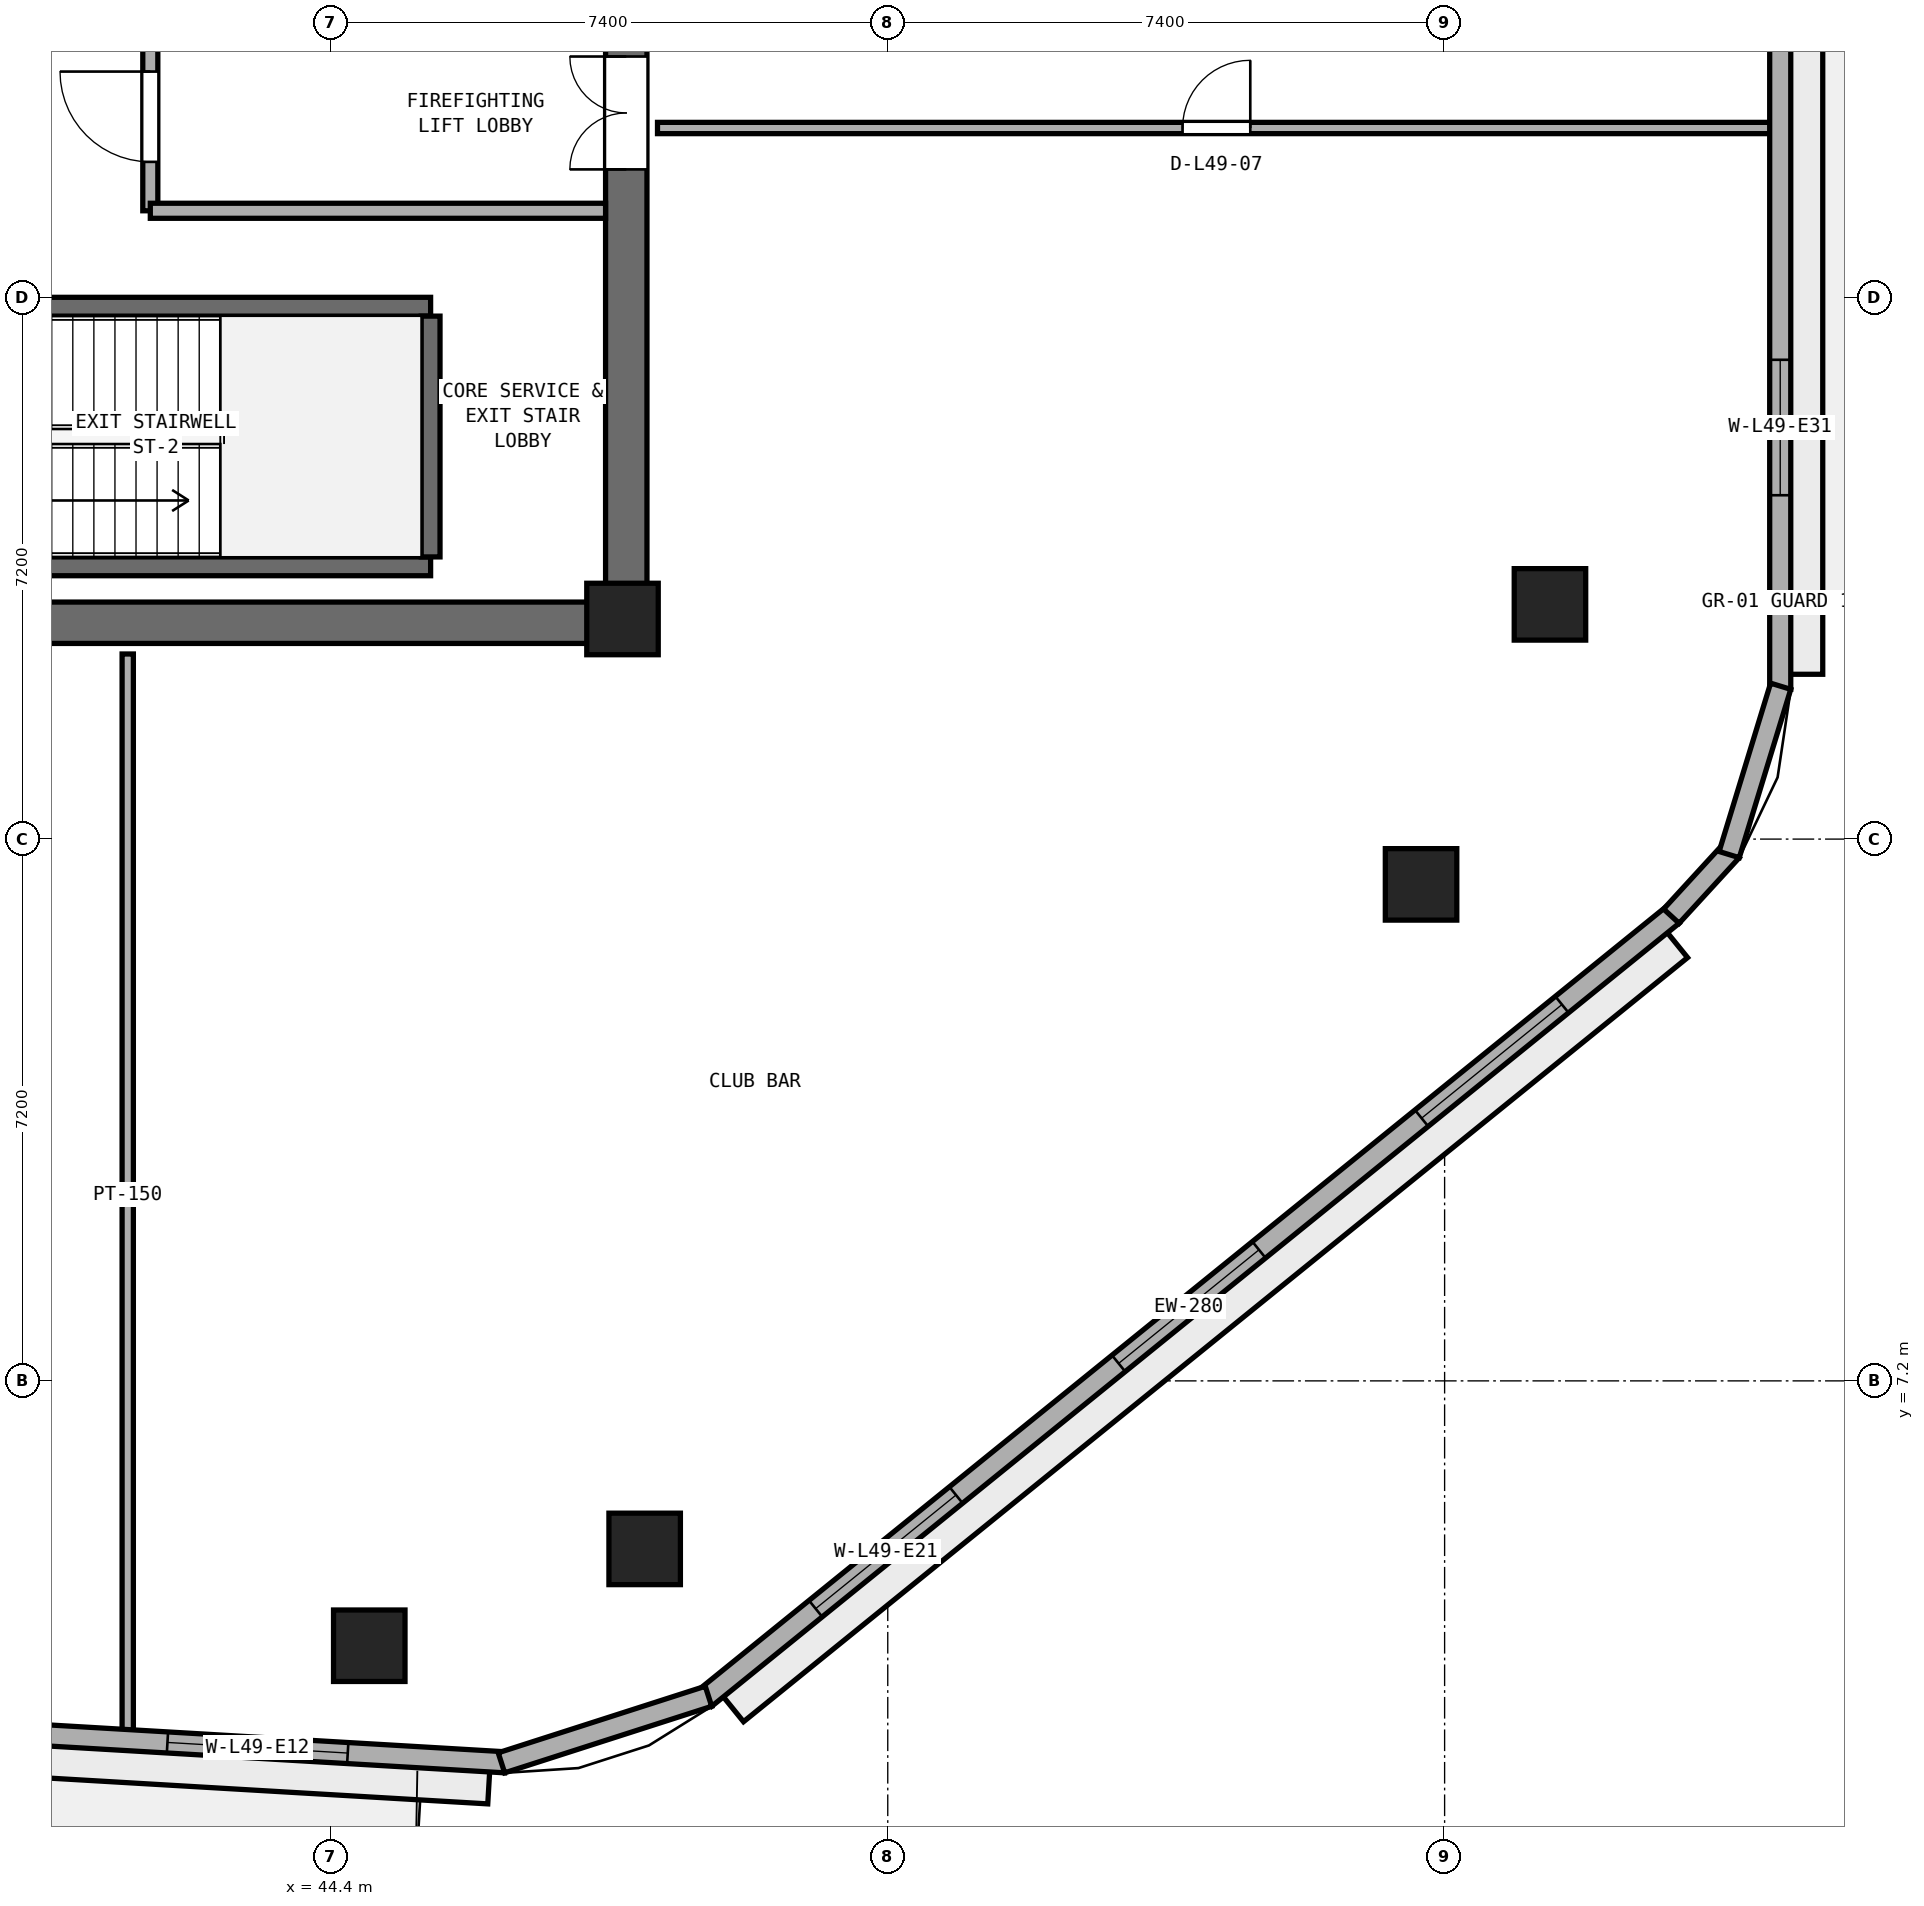
"""IFC4 building model, lengths in metres.
Left out: names, types, materials, properties, quantities, classifications, styles, units other than length and angle.
Written with IfcOpenShell. Run it as: python <this file> out.ifc"""

import sys

from ifc_helpers import new_model, si_unit, direction, frame, frame_2d, origin, origin_2d, place, context, subcontext, project, spatial, rectangle, extrude, element, fill, save


model = new_model("IFC4")
c1 = context("Model", 3, precision=1e-05, world=origin(), true_north=direction((0.0, 1.0)))
c2 = subcontext(c1, "Body", "Model", "MODEL_VIEW")
j1 = project(units=[si_unit("LENGTHUNIT", "METRE"), si_unit("PLANEANGLEUNIT", "RADIAN")], contexts=[c1])
p1 = place(None, origin())
s1 = spatial("IfcSite", under=j1, at=p1, CompositionType="ELEMENT")
p2 = place(p1, origin())
s2 = spatial("IfcBuilding", under=s1, at=p2, CompositionType="ELEMENT")
p3 = place(p2, frame((0.0, 0.0, 193.4)))
s3 = spatial("IfcBuildingStorey", under=s2, at=p3, CompositionType="ELEMENT", Elevation=193.4)
p4 = place(p3, frame((25.4, 17.275, 0.0), z_axis=(0.0, 0.0, 1.0), x_axis=(1.0, 0.0, 0.0)))
e1 = element("IfcWall", 1, at=p4, inside=s3, PredefinedType="SHEAR", context=c2, shape_type="SweptSolid", body=[
    extrude(rectangle(XDim=23.2, YDim=0.55, at=frame_2d((11.6, 0.0))), origin(), (0.0, 0.0, 1.0), 3.54),
])
p5 = place(p3, frame((48.325, 17.55, 0.0), z_axis=(0.0, 0.0, 1.0), x_axis=(0.0, 1.0, 0.0)))
e2 = element("IfcWall", 2, at=p5, inside=s3, PredefinedType="SHEAR", context=c2, shape_type="SweptSolid", body=[
    extrude(rectangle(XDim=15.3, YDim=0.55, at=frame_2d((7.65, 0.0))), origin(), (0.0, 0.0, 1.0), 3.54),
])
p6 = place(p5, frame((5.75, 0.0, 0.0)))
e3 = element("IfcOpeningElement", 3, at=p6, cuts=e2, PredefinedType="OPENING", context=c2, shape_type="SweptSolid", body=[
    extrude(rectangle(XDim=1.5, YDim=2.15, at=frame_2d((0.75, 1.075))), frame((0.0, 0.285, 0.0), z_axis=(0.0, -1.0, 0.0), x_axis=(1.0, 0.0, 0.0)), (0.0, 0.0, 1.0), 0.57),
])
p7 = place(p3, frame((48.275, 17.325, 0.0), z_axis=(0.0, 0.0, 1.0), x_axis=(1.0, 0.0, 0.0)))
e4 = element("IfcColumn", 4, at=p7, inside=s3, PredefinedType="PILASTER", context=c2, shape_type="SweptSolid", body=[
    extrude(rectangle(XDim=0.95, YDim=0.95, at=origin_2d()), origin(), (0.0, 0.0, 1.0), 3.8),
])
for number, where, z_axis, x_axis in (
    (5, (44.91, 3.68, 0.0), (0.0, 0.0, 1.0), (1.0, 0.0, 0.0)),
    (6, (48.57, 4.967, 0.0), (0.0, 0.0, 1.0), (1.0, 0.0, 0.0)),
    (7, (58.887, 13.798, 0.0), (0.0, 0.0, 1.0), (1.0, 0.0, 0.0)),
    (8, (60.6, 17.519, 0.0), (0.0, 0.0, 1.0), (1.0, 0.0, 0.0)),
):
    element("IfcColumn", number, at=place(p3, frame(where, z_axis=z_axis, x_axis=x_axis)), inside=s3, PredefinedType="COLUMN", context=c2, shape_type="SweptSolid", body=[
        extrude(rectangle(XDim=0.95, YDim=0.95, at=origin_2d()), origin(), (0.0, 0.0, 1.0), 3.8),
    ])
for number, where, z_axis, x_axis in (
    (9, (38.425, 18.025, 0.0), (0.0, 0.0, 1.0), (1.0, 0.0, 0.0)),
    (10, (38.425, 21.475, 0.0), (0.0, 0.0, 1.0), (1.0, 0.0, 0.0)),
):
    element("IfcWall", number, at=place(p3, frame(where, z_axis=z_axis, x_axis=x_axis)), inside=s3, PredefinedType="SHEAR", context=c2, shape_type="SweptSolid", body=[
        extrude(rectangle(XDim=7.3, YDim=0.25, at=frame_2d((3.65, 0.0))), origin(), (0.0, 0.0, 1.0), 3.54),
    ])
p8 = place(p3, frame((45.725, 18.15, 0.0), z_axis=(0.0, 0.0, 1.0), x_axis=(0.0, 1.0, 0.0)))
e11 = element("IfcWall", 11, at=p8, inside=s3, PredefinedType="SHEAR", context=c2, shape_type="SweptSolid", body=[
    extrude(rectangle(XDim=3.2, YDim=0.25, at=frame_2d((1.6, 0.0))), origin(), (0.0, 0.0, 1.0), 3.54),
])
p9 = place(p3, frame((42.0, 22.75, 0.0), z_axis=(0.0, 0.0, 1.0), x_axis=(0.0, 1.0, 0.0)))
e12 = element("IfcWall", 12, at=p9, inside=s3, PredefinedType="SOLIDWALL", context=c2, shape_type="SweptSolid", body=[
    extrude(rectangle(XDim=6.05, YDim=0.2, at=frame_2d((3.025, 0.0))), origin(), (0.0, 0.0, 1.0), 3.54),
])
p10 = place(p9, frame((0.65, 0.0, 0.0)))
e13 = element("IfcOpeningElement", 13, at=p10, cuts=e12, PredefinedType="OPENING", context=c2, shape_type="SweptSolid", body=[
    extrude(rectangle(XDim=1.2, YDim=2.15, at=frame_2d((0.6, 1.075))), frame((0.0, 0.11, 0.0), z_axis=(0.0, -1.0, 0.0), x_axis=(1.0, 0.0, 0.0)), (0.0, 0.0, 1.0), 0.22),
])
p11 = place(p3, frame((42.0, 22.75, 0.0), z_axis=(0.0, 0.0, 1.0), x_axis=(1.0, 0.0, 0.0)))
e14 = element("IfcWall", 14, at=p11, inside=s3, PredefinedType="SOLIDWALL", context=c2, shape_type="SweptSolid", body=[
    extrude(rectangle(XDim=6.05, YDim=0.2, at=frame_2d((3.025, 0.0))), origin(), (0.0, 0.0, 1.0), 3.54),
])
p12 = place(p3, frame((41.7, 2.49, 0.0), z_axis=(0.0, 0.0, 1.0), x_axis=(0.0, 1.0, 0.0)))
e15 = element("IfcWall", 15, at=p12, inside=s3, PredefinedType="PARTITIONING", context=c2, shape_type="SweptSolid", body=[
    extrude(rectangle(XDim=14.37, YDim=0.15, at=frame_2d((7.185, 0.0))), origin(), (0.0, 0.0, 1.0), 3.54),
])
p13 = place(p3, frame((48.74, 23.85, 0.0), z_axis=(0.0, 0.0, 1.0), x_axis=(1.0, 0.0, 0.0)))
e16 = element("IfcWall", 16, at=p13, inside=s3, PredefinedType="PARTITIONING", context=c2, shape_type="SweptSolid", body=[
    extrude(rectangle(XDim=14.855, YDim=0.15, at=frame_2d((7.427, 0.0))), origin(), (0.0, 0.0, 1.0), 3.54),
])
p14 = place(p13, frame((6.978, 0.0, 0.0)))
e17 = element("IfcOpeningElement", 17, at=p14, cuts=e16, PredefinedType="OPENING", context=c2, shape_type="SweptSolid", body=[
    extrude(rectangle(XDim=0.9, YDim=2.1, at=frame_2d((0.45, 1.05))), frame((0.0, 0.085, 0.0), z_axis=(0.0, -1.0, 0.0), x_axis=(1.0, 0.0, 0.0)), (0.0, 0.0, 1.0), 0.17),
])
p15 = place(p3, frame((28.966, 3.175, 0.0), z_axis=(0.0, 0.0, 1.0), x_axis=(0.998274467859, -0.058720412304, 0.0)))
e18 = element("IfcWall", 18, at=p15, inside=s3, PredefinedType="STANDARD", context=c2, shape_type="SweptSolid", body=[
    extrude(rectangle(XDim=17.782, YDim=0.28, at=frame_2d((8.891, 0.0))), origin(), (0.0, 0.0, 1.0), 3.54),
])
p16 = place(p15, frame((8.341, 0.0, 0.0)))
e19 = element("IfcOpeningElement", 19, at=p16, cuts=e18, PredefinedType="OPENING", context=c2, shape_type="SweptSolid", body=[
    extrude(rectangle(XDim=1.1, YDim=2.2, at=frame_2d((0.55, 1.1))), frame((0.0, 0.15, 0.0), z_axis=(0.0, -1.0, 0.0), x_axis=(1.0, 0.0, 0.0)), (0.0, 0.0, 1.0), 0.3),
])
p17 = place(p15, frame((2.097, 0.0, 0.9)))
e20 = element("IfcOpeningElement", 20, at=p17, cuts=e18, PredefinedType="OPENING", context=c2, shape_type="SweptSolid", body=[
    extrude(rectangle(XDim=2.4, YDim=1.75, at=frame_2d((1.2, 0.875))), frame((0.0, 0.15, 0.0), z_axis=(0.0, -1.0, 0.0), x_axis=(1.0, 0.0, 0.0)), (0.0, 0.0, 1.0), 0.3),
])
p18 = place(p15, frame((13.285, 0.0, 0.9)))
e21 = element("IfcOpeningElement", 21, at=p18, cuts=e18, PredefinedType="OPENING", context=c2, shape_type="SweptSolid", body=[
    extrude(rectangle(XDim=2.4, YDim=1.75, at=frame_2d((1.2, 0.875))), frame((0.0, 0.15, 0.0), z_axis=(0.0, -1.0, 0.0), x_axis=(1.0, 0.0, 0.0)), (0.0, 0.0, 1.0), 0.3),
])
p19 = place(p3, frame((49.372, 2.984, 0.0), z_axis=(0.0, 0.0, 1.0), x_axis=(0.777278899851, 0.629156190343, 0.0)))
e22 = element("IfcWall", 22, at=p19, inside=s3, PredefinedType="STANDARD", context=c2, shape_type="SweptSolid", body=[
    extrude(rectangle(XDim=16.54, YDim=0.28, at=frame_2d((8.27, 0.0))), origin(), (0.0, 0.0, 1.0), 3.54),
])
p20 = place(p19, frame((1.89, 0.0, 0.9)))
e23 = element("IfcOpeningElement", 23, at=p20, cuts=e22, PredefinedType="OPENING", context=c2, shape_type="SweptSolid", body=[
    extrude(rectangle(XDim=2.4, YDim=1.75, at=frame_2d((1.2, 0.875))), frame((0.0, 0.15, 0.0), z_axis=(0.0, -1.0, 0.0), x_axis=(1.0, 0.0, 0.0)), (0.0, 0.0, 1.0), 0.3),
])
p21 = place(p19, frame((7.07, 0.0, 0.9)))
e24 = element("IfcOpeningElement", 24, at=p21, cuts=e22, PredefinedType="OPENING", context=c2, shape_type="SweptSolid", body=[
    extrude(rectangle(XDim=2.4, YDim=1.75, at=frame_2d((1.2, 0.875))), frame((0.0, 0.15, 0.0), z_axis=(0.0, -1.0, 0.0), x_axis=(1.0, 0.0, 0.0)), (0.0, 0.0, 1.0), 0.3),
])
p22 = place(p19, frame((12.25, 0.0, 0.9)))
e25 = element("IfcOpeningElement", 25, at=p22, cuts=e22, PredefinedType="OPENING", context=c2, shape_type="SweptSolid", body=[
    extrude(rectangle(XDim=2.4, YDim=1.75, at=frame_2d((1.2, 0.875))), frame((0.0, 0.15, 0.0), z_axis=(0.0, -1.0, 0.0), x_axis=(1.0, 0.0, 0.0)), (0.0, 0.0, 1.0), 0.3),
])
p23 = place(p3, frame((63.66, 16.39, 0.0), z_axis=(0.0, 0.0, 1.0), x_axis=(0.0, 1.0, 0.0)))
e26 = element("IfcWall", 26, at=p23, inside=s3, PredefinedType="STANDARD", context=c2, shape_type="SweptSolid", body=[
    extrude(rectangle(XDim=18.876, YDim=0.28, at=frame_2d((9.438, 0.0))), origin(), (0.0, 0.0, 1.0), 2.79),
])
p24 = place(p23, frame((8.588, 0.0, 0.0)))
e27 = element("IfcOpeningElement", 27, at=p24, cuts=e26, PredefinedType="OPENING", context=c2, shape_type="SweptSolid", body=[
    extrude(rectangle(XDim=1.1, YDim=2.2, at=frame_2d((0.55, 1.1))), frame((0.0, 0.15, 0.0), z_axis=(0.0, -1.0, 0.0), x_axis=(1.0, 0.0, 0.0)), (0.0, 0.0, 1.0), 0.3),
])
p25 = place(p23, frame((2.579, 0.0, 0.85)))
e28 = element("IfcOpeningElement", 28, at=p25, cuts=e26, PredefinedType="OPENING", context=c2, shape_type="SweptSolid", body=[
    extrude(rectangle(XDim=1.8, YDim=1.2, at=frame_2d((0.9, 0.6))), frame((0.0, 0.15, 0.0), z_axis=(0.0, -1.0, 0.0), x_axis=(1.0, 0.0, 0.0)), (0.0, 0.0, 1.0), 0.3),
])
p26 = place(p23, frame((14.747, 0.0, 0.85)))
e29 = element("IfcOpeningElement", 29, at=p26, cuts=e26, PredefinedType="OPENING", context=c2, shape_type="SweptSolid", body=[
    extrude(rectangle(XDim=1.8, YDim=1.2, at=frame_2d((0.9, 0.6))), frame((0.0, 0.15, 0.0), z_axis=(0.0, -1.0, 0.0), x_axis=(1.0, 0.0, 0.0)), (0.0, 0.0, 1.0), 0.3),
])
p27 = place(p3, frame((46.666, 2.124, 0.0), z_axis=(0.0, 0.0, 1.0), x_axis=(0.952065470694, 0.305894327363, 0.0)))
e30 = element("IfcWall", 30, at=p27, inside=s3, PredefinedType="STANDARD", context=c2, shape_type="SweptSolid", body=[
    extrude(rectangle(XDim=2.89, YDim=0.28, at=frame_2d((1.445, 0.0))), origin(), (0.0, 0.0, 1.0), 3.54),
])
p28 = place(p3, frame((62.213, 13.376, 0.0), z_axis=(0.0, 0.0, 1.0), x_axis=(0.675790054291, 0.737094161232, 0.0)))
e31 = element("IfcWall", 31, at=p28, inside=s3, PredefinedType="STANDARD", context=c2, shape_type="SweptSolid", body=[
    extrude(rectangle(XDim=1.183, YDim=0.28, at=frame_2d((0.591, 0.0))), origin(), (0.0, 0.0, 1.0), 3.54),
])
p29 = place(p3, frame((62.982, 14.194, 0.0), z_axis=(0.0, 0.0, 1.0), x_axis=(0.292398811023, 0.956296468315, 0.0)))
e32 = element("IfcWall", 32, at=p29, inside=s3, PredefinedType="STANDARD", context=c2, shape_type="SweptSolid", body=[
    extrude(rectangle(XDim=2.34, YDim=0.28, at=frame_2d((1.17, 0.0))), origin(), (0.0, 0.0, 1.0), 3.54),
])
p30 = place(p10, origin())
e33 = element("IfcDoor", 33, at=p30, inside=s3, OperationType="SINGLE_SWING_RIGHT", PredefinedType="DOOR", context=c2, shape_type="SweptSolid", body=[
    extrude(rectangle(XDim=1.2, YDim=2.15, at=frame_2d((0.6, 1.075))), frame((0.0, 0.025, 0.0), z_axis=(0.0, -1.0, 0.0), x_axis=(1.0, 0.0, 0.0)), (0.0, 0.0, 1.0), 0.05),
])
fill(e13, e33)
p31 = place(p6, origin())
e34 = element("IfcDoor", 34, at=p31, inside=s3, OperationType="DOUBLE_DOOR_SINGLE_SWING", PredefinedType="DOOR", context=c2, shape_type="SweptSolid", body=[
    extrude(rectangle(XDim=1.5, YDim=2.15, at=frame_2d((0.75, 1.075))), frame((0.0, 0.025, 0.0), z_axis=(0.0, -1.0, 0.0), x_axis=(1.0, 0.0, 0.0)), (0.0, 0.0, 1.0), 0.05),
])
fill(e3, e34)
p32 = place(p14, origin())
e35 = element("IfcDoor", 35, at=p32, inside=s3, OperationType="SINGLE_SWING_RIGHT", PredefinedType="DOOR", context=c2, shape_type="SweptSolid", body=[
    extrude(rectangle(XDim=0.9, YDim=2.1, at=frame_2d((0.45, 1.05))), frame((0.0, 0.025, 0.0), z_axis=(0.0, -1.0, 0.0), x_axis=(1.0, 0.0, 0.0)), (0.0, 0.0, 1.0), 0.05),
])
fill(e17, e35)
p33 = place(p18, origin())
e36 = element("IfcWindow", 36, at=p33, inside=s3, PartitioningType="SINGLE_PANEL", PredefinedType="WINDOW", context=c2, shape_type="SweptSolid", body=[
    extrude(rectangle(XDim=2.4, YDim=1.75, at=frame_2d((1.2, 0.875))), frame((0.0, 0.03, 0.0), z_axis=(0.0, -1.0, 0.0), x_axis=(1.0, 0.0, 0.0)), (0.0, 0.0, 1.0), 0.06),
])
fill(e21, e36)
p34 = place(p20, origin())
e37 = element("IfcWindow", 37, at=p34, inside=s3, PartitioningType="SINGLE_PANEL", PredefinedType="WINDOW", context=c2, shape_type="SweptSolid", body=[
    extrude(rectangle(XDim=2.4, YDim=1.75, at=frame_2d((1.2, 0.875))), frame((0.0, 0.03, 0.0), z_axis=(0.0, -1.0, 0.0), x_axis=(1.0, 0.0, 0.0)), (0.0, 0.0, 1.0), 0.06),
])
fill(e23, e37)
p35 = place(p21, origin())
e38 = element("IfcWindow", 38, at=p35, inside=s3, PartitioningType="SINGLE_PANEL", PredefinedType="WINDOW", context=c2, shape_type="SweptSolid", body=[
    extrude(rectangle(XDim=2.4, YDim=1.75, at=frame_2d((1.2, 0.875))), frame((0.0, 0.03, 0.0), z_axis=(0.0, -1.0, 0.0), x_axis=(1.0, 0.0, 0.0)), (0.0, 0.0, 1.0), 0.06),
])
fill(e24, e38)
p36 = place(p22, origin())
e39 = element("IfcWindow", 39, at=p36, inside=s3, PartitioningType="SINGLE_PANEL", PredefinedType="WINDOW", context=c2, shape_type="SweptSolid", body=[
    extrude(rectangle(XDim=2.4, YDim=1.75, at=frame_2d((1.2, 0.875))), frame((0.0, 0.03, 0.0), z_axis=(0.0, -1.0, 0.0), x_axis=(1.0, 0.0, 0.0)), (0.0, 0.0, 1.0), 0.06),
])
fill(e25, e39)
p37 = place(p25, origin())
e40 = element("IfcWindow", 40, at=p37, inside=s3, PartitioningType="SINGLE_PANEL", PredefinedType="WINDOW", context=c2, shape_type="SweptSolid", body=[
    extrude(rectangle(XDim=1.8, YDim=1.2, at=frame_2d((0.9, 0.6))), frame((0.0, 0.03, 0.0), z_axis=(0.0, -1.0, 0.0), x_axis=(1.0, 0.0, 0.0)), (0.0, 0.0, 1.0), 0.06),
])
fill(e28, e40)
save(model, sys.argv[1])
